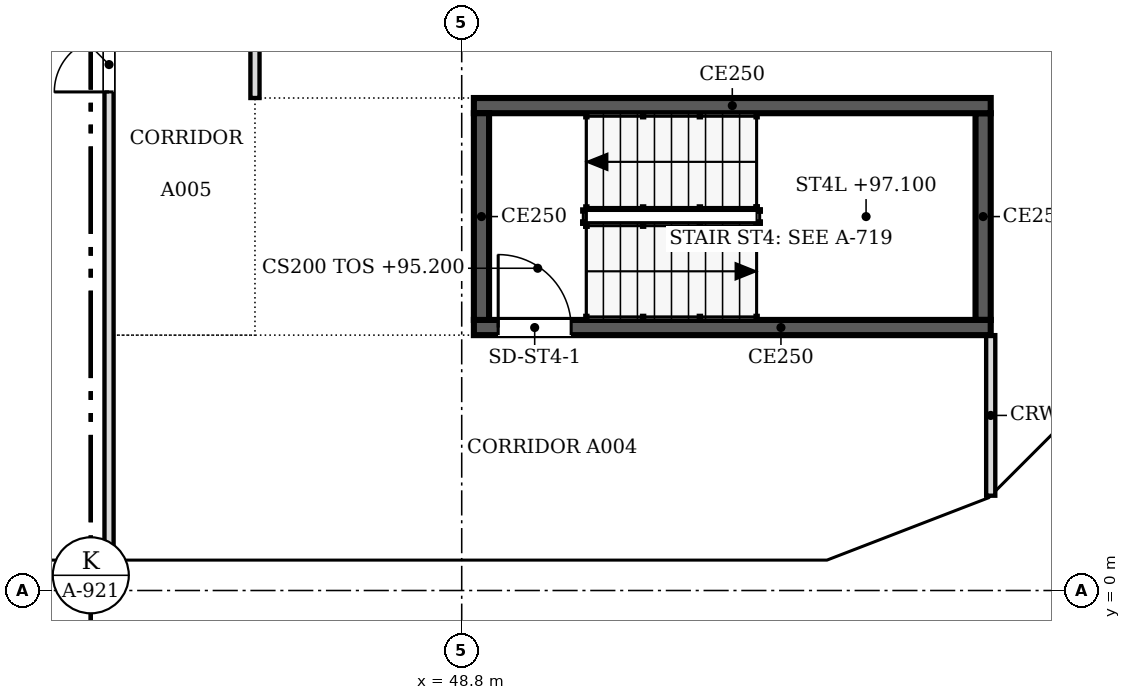
"""IFC4 building model, lengths in metres.
Left out: names, types, materials, properties, quantities, classifications, styles, units other than length and angle.
Written with IfcOpenShell. Run it as: python <this file> out.ifc"""

import sys

from ifc_helpers import new_model, si_unit, direction, frame, frame_2d, origin, place, context, subcontext, project, spatial, polyline, rectangle, outline, extrude, faceted_brep, source, transform, mapped, element, fill, save


model = new_model("IFC4")
c1 = context("Model", 3, precision=1e-05, world=origin(), true_north=direction((0.0, 1.0)))
c2 = subcontext(c1, "Body", "Model", "MODEL_VIEW")
j1 = project(units=[si_unit("LENGTHUNIT", "METRE"), si_unit("PLANEANGLEUNIT", "RADIAN")], contexts=[c1])
p1 = place(None, origin())
s1 = spatial("IfcSite", under=j1, at=p1, CompositionType="ELEMENT")
p2 = place(p1, origin())
s2 = spatial("IfcBuilding", under=s1, at=p2, CompositionType="ELEMENT")
p3 = place(p2, frame((0.0, 0.0, 95.2)))
s3 = spatial("IfcBuildingStorey", under=s2, at=p3, CompositionType="ELEMENT", Elevation=95.2)
m1 = source(origin(), c2, "Body", "Brep", [
    faceted_brep([(3.05, -0.25, 0.0), (6.1, -0.25, 3.8), (6.1, -0.25, 3.8), (3.05, -0.25, 7.6), (0.0, -0.25, 3.8), (0.0, 0.25, 3.8), (3.05, 0.25, 7.6), (6.1, 0.25, 3.8), (6.1, 0.25, 3.8), (3.05, 0.25, 0.0)], [[[0, 1, 2, 3, 4]], [[5, 6, 7, 8, 9]], [[9, 8, 1, 0]], [[7, 6, 3, 2]], [[6, 5, 4, 3]], [[5, 9, 0, 4]], [[1, 8, 7, 2]]]),
])
p4 = place(p3, frame((36.6, 0.25, -3.8), z_axis=(0.0, 0.0, 1.0), x_axis=(1.0, 0.0, 0.0)))
e1 = element("IfcWall", 1, at=p4, inside=s3, PredefinedType="SOLIDWALL", context=c2, shape_type="MappedRepresentation", body=[
    mapped(m1, transform((0.0, 0.0, 0.0), scale=1.0)),
])
m2 = source(origin(), c2, "Body", "SweptSolid", [
    extrude(outline(polyline([(3.05, 0.399), (5.78, 3.8), (3.05, 7.201), (0.321, 3.8), (3.05, 0.399)])), frame((0.0, 0.26, 0.0), z_axis=(0.0, -1.0, 0.0), x_axis=(1.0, 0.0, 0.0)), (0.0, 0.0, 1.0), 0.52),
])
p5 = place(p4, origin())
e2 = element("IfcOpeningElement", 2, at=p5, cuts=e1, PredefinedType="OPENING", context=c2, shape_type="MappedRepresentation", body=[
    mapped(m2, transform((0.0, 0.0, 0.0), scale=1.0)),
])
m3 = source(origin(), c2, "Body", "SweptSolid", [
    extrude(outline(polyline([(3.05, 0.0), (6.1, 3.8), (3.05, 7.6), (0.0, 3.8), (3.05, 0.0)])), frame((0.0, 0.25, 0.0), z_axis=(0.0, -1.0, 0.0), x_axis=(1.0, 0.0, 0.0)), (0.0, 0.0, 1.0), 0.5),
])
p6 = place(p3, frame((42.7, 0.25, -3.8), z_axis=(0.0, 0.0, 1.0), x_axis=(1.0, 0.0, 0.0)))
e3 = element("IfcWall", 3, at=p6, inside=s3, PredefinedType="SOLIDWALL", context=c2, shape_type="MappedRepresentation", body=[
    mapped(m3, transform((0.0, 0.0, 0.0), scale=1.0)),
])
p7 = place(p6, origin())
e4 = element("IfcOpeningElement", 4, at=p7, cuts=e3, PredefinedType="OPENING", context=c2, shape_type="MappedRepresentation", body=[
    mapped(m2, transform((0.0, 0.0, 0.0), scale=1.0)),
])
m4 = source(origin(), c2, "Body", "Brep", [
    faceted_brep([(3.05, -0.25, 0.0), (6.053, -0.25, 3.8), (3.05, -0.25, 7.6), (0.0, -0.25, 3.8), (0.0, 0.25, 3.8), (3.05, 0.25, 7.6), (6.007, 0.25, 3.859), (6.007, 0.25, 3.741), (3.05, 0.25, 0.0), (6.053, 0.0, 3.8)], [[[0, 1, 2, 3]], [[4, 5, 6, 7, 8]], [[8, 7, 9, 1, 0]], [[6, 5, 2, 1, 9]], [[5, 4, 3, 2]], [[4, 8, 0, 3]], [[9, 7, 6]]]),
])
p8 = place(p3, frame((48.8, 0.25, -3.8), z_axis=(0.0, 0.0, 1.0), x_axis=(1.0, 0.0, 0.0)))
e5 = element("IfcWall", 5, at=p8, inside=s3, PredefinedType="SOLIDWALL", context=c2, shape_type="MappedRepresentation", body=[
    mapped(m4, transform((0.0, 0.0, 0.0), scale=1.0)),
])
m5 = source(origin(), c2, "Body", "SweptSolid", [
    extrude(outline(polyline([(3.049, 0.401), (5.735, 3.8), (3.049, 7.199), (0.321, 3.8), (3.049, 0.401)])), frame((0.0, 0.26, 0.0), z_axis=(0.0, -1.0, 0.0), x_axis=(1.0, 0.0, 0.0)), (0.0, 0.0, 1.0), 0.52),
])
p9 = place(p8, origin())
e6 = element("IfcOpeningElement", 6, at=p9, cuts=e5, PredefinedType="OPENING", context=c2, shape_type="MappedRepresentation", body=[
    mapped(m5, transform((0.0, 0.0, 0.0), scale=1.0)),
])
m6 = source(origin(), c2, "Body", "Brep", [
    faceted_brep([(2.95, -0.25, 0.0), (3.003, -0.25, 0.068), (3.003, -0.25, 7.532), (2.95, -0.25, 7.6), (0.0, -0.25, 3.8), (0.047, 0.25, 3.86), (2.898, 0.25, 7.532), (2.898, 0.25, 0.068), (0.047, 0.25, 3.74), (2.95, 0.0, 0.0), (2.95, 0.0, 7.6), (0.0, 0.0, 3.8)], [[[0, 1, 2, 3, 4]], [[5, 6, 7, 8]], [[1, 0, 9]], [[10, 3, 2]], [[6, 5, 11, 4, 3, 10]], [[8, 7, 9, 0, 4, 11]], [[8, 11, 5]], [[1, 9, 7, 6, 10, 2]]]),
])
p10 = place(p3, frame((54.854, 0.25, -3.8), z_axis=(0.0, 0.0, 1.0), x_axis=(0.932970071518, 0.359953949349, 0.0)))
e7 = element("IfcWall", 7, at=p10, inside=s3, PredefinedType="SOLIDWALL", context=c2, shape_type="MappedRepresentation", body=[
    mapped(m6, transform((0.0, 0.0, 0.0), scale=1.0)),
])
m7 = source(origin(), c2, "Body", "SweptSolid", [
    extrude(outline(polyline([(2.75, 6.935), (0.316, 3.8), (2.75, 0.665), (2.75, 6.935)])), frame((0.0, 0.26, 0.0), z_axis=(0.0, -1.0, 0.0), x_axis=(1.0, 0.0, 0.0)), (0.0, 0.0, 1.0), 0.52),
])
p11 = place(p10, origin())
e8 = element("IfcOpeningElement", 8, at=p11, cuts=e7, PredefinedType="OPENING", context=c2, shape_type="MappedRepresentation", body=[
    mapped(m7, transform((0.0, 0.0, 0.0), scale=1.0)),
])
m8 = source(origin(), c2, "Body", "Brep", [
    faceted_brep([(0.053, -0.25, 0.0), (2.997, -0.25, 3.8), (0.053, -0.25, 7.6), (0.0, -0.25, 7.532), (0.0, -0.25, 0.068), (0.106, 0.25, 7.532), (2.944, 0.25, 3.868), (2.944, 0.25, 3.732), (0.106, 0.25, 0.068), (2.997, 0.0, 3.8), (0.053, 0.0, 0.0), (0.053, 0.0, 7.6)], [[[0, 1, 2, 3, 4]], [[5, 6, 7, 8]], [[8, 7, 9, 1, 0, 10]], [[6, 5, 11, 2, 1, 9]], [[3, 2, 11]], [[10, 0, 4]], [[8, 10, 4, 3, 11, 5]], [[9, 7, 6]]]),
])
p12 = place(p3, frame((57.569, 1.274, -3.8), z_axis=(0.0, 0.0, 1.0), x_axis=(0.707066050402, 0.707147509625, 0.0)))
e9 = element("IfcWall", 9, at=p12, inside=s3, PredefinedType="SOLIDWALL", context=c2, shape_type="MappedRepresentation", body=[
    mapped(m8, transform((0.0, 0.0, 0.0), scale=1.0)),
])
m9 = source(origin(), c2, "Body", "SweptSolid", [
    extrude(outline(polyline([(0.253, 0.667), (2.681, 3.8), (0.253, 6.934), (0.253, 0.667)])), frame((0.0, 0.26, 0.0), z_axis=(0.0, -1.0, 0.0), x_axis=(1.0, 0.0, 0.0)), (0.0, 0.0, 1.0), 0.52),
])
p13 = place(p12, origin())
e10 = element("IfcOpeningElement", 10, at=p13, cuts=e9, PredefinedType="OPENING", context=c2, shape_type="MappedRepresentation", body=[
    mapped(m9, transform((0.0, 0.0, 0.0), scale=1.0)),
])
p14 = place(p2, frame((0.0, 0.0, 99.0)))
s4 = spatial("IfcBuildingStorey", under=s2, at=p14, CompositionType="ELEMENT", Elevation=99.0)
p15 = place(p14, frame((39.65, 0.25, -3.8), z_axis=(0.0, 0.0, 1.0), x_axis=(1.0, 0.0, 0.0)))
e11 = element("IfcWall", 11, at=p15, inside=s4, PredefinedType="SOLIDWALL", context=c2, shape_type="MappedRepresentation", body=[
    mapped(m3, transform((0.0, 0.0, 0.0), scale=1.0)),
])
p16 = place(p15, origin())
e12 = element("IfcOpeningElement", 12, at=p16, cuts=e11, PredefinedType="OPENING", context=c2, shape_type="MappedRepresentation", body=[
    mapped(m2, transform((0.0, 0.0, 0.0), scale=1.0)),
])
p17 = place(p14, frame((45.75, 0.25, -3.8), z_axis=(0.0, 0.0, 1.0), x_axis=(1.0, 0.0, 0.0)))
e13 = element("IfcWall", 13, at=p17, inside=s4, PredefinedType="SOLIDWALL", context=c2, shape_type="MappedRepresentation", body=[
    mapped(m3, transform((0.0, 0.0, 0.0), scale=1.0)),
])
p18 = place(p17, origin())
e14 = element("IfcOpeningElement", 14, at=p18, cuts=e13, PredefinedType="OPENING", context=c2, shape_type="MappedRepresentation", body=[
    mapped(m2, transform((0.0, 0.0, 0.0), scale=1.0)),
])
m10 = source(origin(), c2, "Body", "Brep", [
    faceted_brep([(3.003, -0.25, 0.0), (3.05, -0.25, 0.06), (3.05, -0.25, 7.54), (3.003, -0.25, 7.6), (0.0, -0.25, 3.8), (0.0, 0.25, 3.8), (2.957, 0.25, 7.541), (2.957, 0.25, 0.059), (3.003, 0.0, 0.0), (3.003, 0.0, 7.6)], [[[0, 1, 2, 3, 4]], [[5, 6, 7]], [[1, 0, 8]], [[9, 3, 2]], [[6, 5, 4, 3, 9]], [[5, 7, 8, 0, 4]], [[1, 8, 7, 6, 9, 2]]]),
])
p19 = place(p14, frame((51.85, 0.25, -3.8), z_axis=(0.0, 0.0, 1.0), x_axis=(1.0, 0.0, 0.0)))
e15 = element("IfcWall", 15, at=p19, inside=s4, PredefinedType="SOLIDWALL", context=c2, shape_type="MappedRepresentation", body=[
    mapped(m10, transform((0.0, 0.0, 0.0), scale=1.0)),
])
m11 = source(origin(), c2, "Body", "SweptSolid", [
    extrude(outline(polyline([(2.803, 6.944), (0.319, 3.8), (2.803, 0.656), (2.803, 6.944)])), frame((0.0, 0.26, 0.0), z_axis=(0.0, -1.0, 0.0), x_axis=(1.0, 0.0, 0.0)), (0.0, 0.0, 1.0), 0.52),
])
p20 = place(p19, origin())
e16 = element("IfcOpeningElement", 16, at=p20, cuts=e15, PredefinedType="OPENING", context=c2, shape_type="MappedRepresentation", body=[
    mapped(m11, transform((0.0, 0.0, 0.0), scale=1.0)),
])
m12 = source(origin(), c2, "Body", "Brep", [
    faceted_brep([(0.047, -0.25, 0.0), (2.997, -0.25, 3.8), (0.047, -0.25, 7.6), (0.0, -0.25, 7.541), (0.0, -0.25, 0.059), (0.093, 0.25, 7.54), (2.944, 0.25, 3.868), (2.944, 0.25, 3.732), (0.093, 0.25, 0.06), (2.997, 0.0, 3.8), (0.047, 0.0, 0.0), (0.047, 0.0, 7.6)], [[[0, 1, 2, 3, 4]], [[5, 6, 7, 8]], [[8, 7, 9, 1, 0, 10]], [[6, 5, 11, 2, 1, 9]], [[3, 2, 11]], [[10, 0, 4]], [[8, 10, 4, 3, 11, 5]], [[9, 7, 6]]]),
])
p21 = place(p14, frame((54.81, 0.233, -3.8), z_axis=(0.0, 0.0, 1.0), x_axis=(0.932990326376, 0.359901446078, 0.0)))
e17 = element("IfcWall", 17, at=p21, inside=s4, PredefinedType="SOLIDWALL", context=c2, shape_type="MappedRepresentation", body=[
    mapped(m12, transform((0.0, 0.0, 0.0), scale=1.0)),
])
m13 = source(origin(), c2, "Body", "SweptSolid", [
    extrude(outline(polyline([(0.247, 0.665), (2.681, 3.8), (0.247, 6.935), (0.247, 0.665)])), frame((0.0, 0.26, 0.0), z_axis=(0.0, -1.0, 0.0), x_axis=(1.0, 0.0, 0.0)), (0.0, 0.0, 1.0), 0.52),
])
p22 = place(p21, origin())
e18 = element("IfcOpeningElement", 18, at=p22, cuts=e17, PredefinedType="OPENING", context=c2, shape_type="MappedRepresentation", body=[
    mapped(m13, transform((0.0, 0.0, 0.0), scale=1.0)),
])
m14 = source(origin(), c2, "Body", "Brep", [
    faceted_brep([(2.944, -0.25, 0.0), (2.997, -0.25, 0.068), (2.997, -0.25, 7.532), (2.944, -0.25, 7.6), (0.0, -0.25, 3.8), (0.053, 0.25, 3.868), (2.891, 0.25, 7.532), (2.891, 0.25, 0.068), (0.053, 0.25, 3.732), (2.944, 0.0, 0.0), (2.944, 0.0, 7.6), (0.0, 0.0, 3.8)], [[[0, 1, 2, 3, 4]], [[5, 6, 7, 8]], [[1, 0, 9]], [[10, 3, 2]], [[6, 5, 11, 4, 3, 10]], [[8, 7, 9, 0, 4, 11]], [[8, 11, 5]], [[1, 9, 7, 6, 10, 2]]]),
])
p23 = place(p14, frame((57.606, 1.312, -3.8), z_axis=(0.0, 0.0, 1.0), x_axis=(0.707147509625, 0.707066050402, 0.0)))
e19 = element("IfcWall", 19, at=p23, inside=s4, PredefinedType="SOLIDWALL", context=c2, shape_type="MappedRepresentation", body=[
    mapped(m14, transform((0.0, 0.0, 0.0), scale=1.0)),
])
m15 = source(origin(), c2, "Body", "SweptSolid", [
    extrude(outline(polyline([(2.744, 6.934), (0.316, 3.8), (2.744, 0.666), (2.744, 6.934)])), frame((0.0, 0.26, 0.0), z_axis=(0.0, -1.0, 0.0), x_axis=(1.0, 0.0, 0.0)), (0.0, 0.0, 1.0), 0.52),
])
p24 = place(p23, origin())
e20 = element("IfcOpeningElement", 20, at=p24, cuts=e19, PredefinedType="OPENING", context=c2, shape_type="MappedRepresentation", body=[
    mapped(m15, transform((0.0, 0.0, 0.0), scale=1.0)),
])
p25 = place(p3, frame((57.5, 4.325, 0.0), z_axis=(0.0, 0.0, 1.0), x_axis=(-1.0, 0.0, 0.0)))
e21 = element("IfcWall", 21, at=p25, inside=s3, PredefinedType="SOLIDWALL", context=c2, shape_type="SweptSolid", body=[
    extrude(rectangle(XDim=8.5, YDim=0.25, at=frame_2d((4.25, 0.0))), origin(), (0.0, 0.0, 1.0), 3.8),
])
m16 = source(origin(), c2, "Body", "SweptSolid", [
    extrude(rectangle(XDim=1.2, YDim=2.1, at=frame_2d((0.6, 1.05))), frame((0.0, 0.135, 0.0), z_axis=(0.0, -1.0, 0.0), x_axis=(1.0, 0.0, 0.0)), (0.0, 0.0, 1.0), 0.27),
])
p26 = place(p25, frame((6.9, 0.0, 0.0)))
e22 = element("IfcOpeningElement", 22, at=p26, cuts=e21, PredefinedType="OPENING", context=c2, shape_type="MappedRepresentation", body=[
    mapped(m16, transform((0.0, 0.0, 0.0), scale=1.0)),
])
p27 = place(p3, frame((49.125, 4.45, 0.0), z_axis=(0.0, 0.0, 1.0), x_axis=(0.0, 1.0, 0.0)))
e23 = element("IfcWall", 23, at=p27, inside=s3, PredefinedType="SOLIDWALL", context=c2, shape_type="SweptSolid", body=[
    extrude(rectangle(XDim=3.4, YDim=0.25, at=frame_2d((1.7, 0.0))), origin(), (0.0, 0.0, 1.0), 3.8),
])
p28 = place(p3, frame((49.0, 7.975, 0.0), z_axis=(0.0, 0.0, 1.0), x_axis=(1.0, 0.0, 0.0)))
e24 = element("IfcWall", 24, at=p28, inside=s3, PredefinedType="SOLIDWALL", context=c2, shape_type="SweptSolid", body=[
    extrude(rectangle(XDim=8.5, YDim=0.25, at=frame_2d((4.25, 0.0))), origin(), (0.0, 0.0, 1.0), 3.8),
])
p29 = place(p3, frame((57.375, 7.85, 0.0), z_axis=(0.0, 0.0, 1.0), x_axis=(0.0, -1.0, 0.0)))
e25 = element("IfcWall", 25, at=p29, inside=s3, PredefinedType="SOLIDWALL", context=c2, shape_type="SweptSolid", body=[
    extrude(rectangle(XDim=3.4, YDim=0.25, at=frame_2d((1.7, 0.0))), origin(), (0.0, 0.0, 1.0), 3.8),
])
p30 = place(p3, frame((43.0, 0.5, 0.0), z_axis=(0.0, 0.0, 1.0), x_axis=(0.0, 1.0, 0.0)))
e26 = element("IfcWall", 26, at=p30, inside=s3, PredefinedType="PARTITIONING", context=c2, shape_type="SweptSolid", body=[
    extrude(rectangle(XDim=21.424, YDim=0.15, at=frame_2d((10.712, 0.0))), origin(), (0.0, 0.0, 1.0), 3.067),
])
m17 = source(origin(), c2, "Body", "SweptSolid", [
    extrude(rectangle(XDim=0.9, YDim=2.1, at=frame_2d((0.45, 1.05))), frame((0.0, 0.085, 0.0), z_axis=(0.0, -1.0, 0.0), x_axis=(1.0, 0.0, 0.0)), (0.0, 0.0, 1.0), 0.17),
])
p31 = place(p30, frame((16.601, 0.0, 0.0)))
e27 = element("IfcOpeningElement", 27, at=p31, cuts=e26, PredefinedType="OPENING", context=c2, shape_type="MappedRepresentation", body=[
    mapped(m17, transform((0.0, 0.0, 0.0), scale=1.0)),
])
p32 = place(p30, frame((7.7, 0.0, 0.0)))
e28 = element("IfcOpeningElement", 28, at=p32, cuts=e26, PredefinedType="OPENING", context=c2, shape_type="MappedRepresentation", body=[
    mapped(m17, transform((0.0, 0.0, 0.0), scale=1.0)),
])
p33 = place(p3, frame((57.5, 1.559, 0.0), z_axis=(0.0, 0.0, 1.0), x_axis=(0.0, 1.0, 0.0)))
e29 = element("IfcWall", 29, at=p33, inside=s3, PredefinedType="PARTITIONING", context=c2, shape_type="SweptSolid", body=[
    extrude(rectangle(XDim=2.641, YDim=0.15, at=frame_2d((1.32, 0.0))), origin(), (0.0, 0.0, 1.0), 3.067),
])
p34 = place(p3, frame((45.4, 21.924, 0.0), z_axis=(0.0, 0.0, 1.0), x_axis=(0.0, -1.0, 0.0)))
e30 = element("IfcWall", 30, at=p34, inside=s3, PredefinedType="PARTITIONING", context=c2, shape_type="SweptSolid", body=[
    extrude(rectangle(XDim=13.824, YDim=0.15, at=frame_2d((6.912, 0.0))), origin(), (0.0, 0.0, 1.0), 3.067),
])
p35 = place(p34, frame((10.424, 0.0, 0.0)))
e31 = element("IfcOpeningElement", 31, at=p35, cuts=e30, PredefinedType="OPENING", context=c2, shape_type="MappedRepresentation", body=[
    mapped(m17, transform((0.0, 0.0, 0.0), scale=1.0)),
])
p36 = place(p34, frame((3.424, 0.0, 0.0)))
e32 = element("IfcOpeningElement", 32, at=p36, cuts=e30, PredefinedType="OPENING", context=c2, shape_type="MappedRepresentation", body=[
    mapped(m17, transform((0.0, 0.0, 0.0), scale=1.0)),
])
m18 = source(origin(), c2, "Body", "SweptSolid", [
    extrude(rectangle(XDim=1.2, YDim=2.1, at=frame_2d((0.6, 1.05))), frame((0.0, 0.025, 0.0), z_axis=(0.0, -1.0, 0.0), x_axis=(1.0, 0.0, 0.0)), (0.0, 0.0, 1.0), 0.05),
])
p37 = place(p26, origin())
e33 = element("IfcDoor", 33, at=p37, inside=s3, OperationType="SINGLE_SWING_RIGHT", PredefinedType="DOOR", context=c2, shape_type="MappedRepresentation", body=[
    mapped(m18, transform((0.0, 0.0, 0.0), scale=1.0)),
])
fill(e22, e33)
m19 = source(origin(), c2, "Body", "SweptSolid", [
    extrude(rectangle(XDim=0.9, YDim=2.1, at=frame_2d((0.45, 1.05))), frame((0.0, 0.025, 0.0), z_axis=(0.0, -1.0, 0.0), x_axis=(1.0, 0.0, 0.0)), (0.0, 0.0, 1.0), 0.05),
])
p38 = place(p32, origin())
e34 = element("IfcDoor", 34, at=p38, inside=s3, OperationType="SINGLE_SWING_LEFT", PredefinedType="DOOR", context=c2, shape_type="MappedRepresentation", body=[
    mapped(m19, transform((0.0, 0.0, 0.0), scale=1.0)),
])
fill(e28, e34)
save(model, sys.argv[1])
